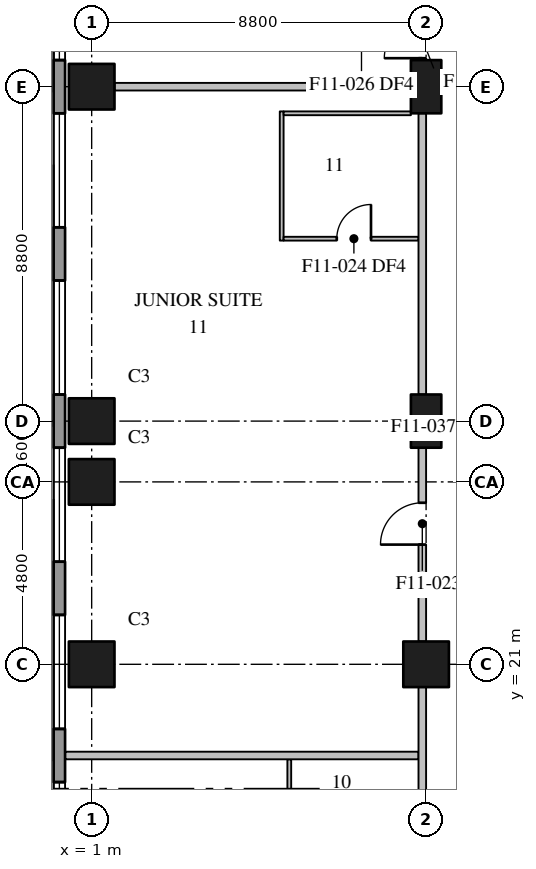
"""IFC4 building model, lengths in metres.
Left out: names, types, materials, properties, quantities, classifications, styles, units other than length and angle.
Written with IfcOpenShell. Run it as: python <this file> out.ifc"""

import sys

from ifc_helpers import new_model, si_unit, direction, frame, frame_2d, origin, origin_2d, place, context, subcontext, project, spatial, rectangle, extrude, element, fill, save


model = new_model("IFC4")
c1 = context("Model", 3, precision=1e-05, world=origin(), true_north=direction((0.0, 1.0)))
c2 = subcontext(c1, "Body", "Model", "MODEL_VIEW")
j1 = project(units=[si_unit("LENGTHUNIT", "METRE"), si_unit("PLANEANGLEUNIT", "RADIAN")], contexts=[c1])
p1 = place(None, origin())
s1 = spatial("IfcSite", under=j1, at=p1, CompositionType="ELEMENT")
p2 = place(p1, origin())
s2 = spatial("IfcBuilding", under=s1, at=p2, CompositionType="ELEMENT")
p3 = place(p2, frame((0.0, 0.0, 107.4)))
s3 = spatial("IfcBuildingStorey", under=s2, at=p3, CompositionType="ELEMENT", Elevation=107.4)
for number, where, z_axis, x_axis in (
    (1, (1.0, 21.0, 0.0), (0.0, 0.0, 1.0), (1.0, 0.0, 0.0)),
    (2, (1.0, 25.8, 0.0), (0.0, 0.0, 1.0), (1.0, 0.0, 0.0)),
    (3, (1.0, 27.4, 0.0), (0.0, 0.0, 1.0), (1.0, 0.0, 0.0)),
    (4, (1.0, 36.2, 0.0), (0.0, 0.0, 1.0), (1.0, 0.0, 0.0)),
    (5, (9.8, 21.0, 0.0), (0.0, 0.0, 1.0), (1.0, 0.0, 0.0)),
):
    element("IfcColumn", number, at=place(p3, frame(where, z_axis=z_axis, x_axis=x_axis)), inside=s3, PredefinedType="COLUMN", context=c2, shape_type="SweptSolid", body=[
        extrude(rectangle(XDim=1.2, YDim=1.2, at=origin_2d()), origin(), (0.0, 0.0, 1.0), 3.7),
    ])
for number, where, z_axis, x_axis in (
    (6, (9.8, 27.4, 0.0), (0.0, 0.0, 1.0), (0.0, 1.0, 0.0)),
    (7, (9.8, 36.2, 0.0), (0.0, 0.0, 1.0), (0.0, 1.0, 0.0)),
):
    element("IfcColumn", number, at=place(p3, frame(where, z_axis=z_axis, x_axis=x_axis)), inside=s3, PredefinedType="COLUMN", context=c2, shape_type="SweptSolid", body=[
        extrude(rectangle(XDim=1.4, YDim=0.8, at=origin_2d()), origin(), (0.0, 0.0, 1.0), 3.7),
    ])
p4 = place(p3, frame((0.15, 78.7, 0.0), z_axis=(0.0, 0.0, 1.0), x_axis=(0.0, -1.0, 0.0)))
e8 = element("IfcWall", 8, at=p4, inside=s3, PredefinedType="STANDARD", context=c2, shape_type="SweptSolid", body=[
    extrude(rectangle(XDim=76.5, YDim=0.3, at=frame_2d((38.25, 0.0))), origin(), (0.0, 0.0, 1.0), 3.4),
])
p5 = place(p4, frame((3.6, 0.0, 0.75)))
e9 = element("IfcOpeningElement", 9, at=p5, cuts=e8, PredefinedType="OPENING", context=c2, shape_type="SweptSolid", body=[
    extrude(rectangle(XDim=3.0, YDim=2.3, at=frame_2d((1.5, 1.15))), frame((0.0, 0.16, 0.0), z_axis=(0.0, -1.0, 0.0), x_axis=(1.0, 0.0, 0.0)), (0.0, 0.0, 1.0), 0.32),
])
p6 = place(p4, frame((8.0, 0.0, 0.75)))
e10 = element("IfcOpeningElement", 10, at=p6, cuts=e8, PredefinedType="OPENING", context=c2, shape_type="SweptSolid", body=[
    extrude(rectangle(XDim=3.0, YDim=2.3, at=frame_2d((1.5, 1.15))), frame((0.0, 0.16, 0.0), z_axis=(0.0, -1.0, 0.0), x_axis=(1.0, 0.0, 0.0)), (0.0, 0.0, 1.0), 0.32),
])
p7 = place(p4, frame((12.4, 0.0, 0.75)))
e11 = element("IfcOpeningElement", 11, at=p7, cuts=e8, PredefinedType="OPENING", context=c2, shape_type="SweptSolid", body=[
    extrude(rectangle(XDim=3.0, YDim=2.3, at=frame_2d((1.5, 1.15))), frame((0.0, 0.16, 0.0), z_axis=(0.0, -1.0, 0.0), x_axis=(1.0, 0.0, 0.0)), (0.0, 0.0, 1.0), 0.32),
])
p8 = place(p4, frame((16.8, 0.0, 0.75)))
e12 = element("IfcOpeningElement", 12, at=p8, cuts=e8, PredefinedType="OPENING", context=c2, shape_type="SweptSolid", body=[
    extrude(rectangle(XDim=3.0, YDim=2.3, at=frame_2d((1.5, 1.15))), frame((0.0, 0.16, 0.0), z_axis=(0.0, -1.0, 0.0), x_axis=(1.0, 0.0, 0.0)), (0.0, 0.0, 1.0), 0.32),
])
p9 = place(p4, frame((21.2, 0.0, 0.75)))
e13 = element("IfcOpeningElement", 13, at=p9, cuts=e8, PredefinedType="OPENING", context=c2, shape_type="SweptSolid", body=[
    extrude(rectangle(XDim=3.0, YDim=2.3, at=frame_2d((1.5, 1.15))), frame((0.0, 0.16, 0.0), z_axis=(0.0, -1.0, 0.0), x_axis=(1.0, 0.0, 0.0)), (0.0, 0.0, 1.0), 0.32),
])
p10 = place(p4, frame((25.6, 0.0, 0.75)))
e14 = element("IfcOpeningElement", 14, at=p10, cuts=e8, PredefinedType="OPENING", context=c2, shape_type="SweptSolid", body=[
    extrude(rectangle(XDim=3.0, YDim=2.3, at=frame_2d((1.5, 1.15))), frame((0.0, 0.16, 0.0), z_axis=(0.0, -1.0, 0.0), x_axis=(1.0, 0.0, 0.0)), (0.0, 0.0, 1.0), 0.32),
])
p11 = place(p4, frame((30.0, 0.0, 0.75)))
e15 = element("IfcOpeningElement", 15, at=p11, cuts=e8, PredefinedType="OPENING", context=c2, shape_type="SweptSolid", body=[
    extrude(rectangle(XDim=3.0, YDim=2.3, at=frame_2d((1.5, 1.15))), frame((0.0, 0.16, 0.0), z_axis=(0.0, -1.0, 0.0), x_axis=(1.0, 0.0, 0.0)), (0.0, 0.0, 1.0), 0.32),
])
p12 = place(p4, frame((34.4, 0.0, 0.75)))
e16 = element("IfcOpeningElement", 16, at=p12, cuts=e8, PredefinedType="OPENING", context=c2, shape_type="SweptSolid", body=[
    extrude(rectangle(XDim=3.0, YDim=2.3, at=frame_2d((1.5, 1.15))), frame((0.0, 0.16, 0.0), z_axis=(0.0, -1.0, 0.0), x_axis=(1.0, 0.0, 0.0)), (0.0, 0.0, 1.0), 0.32),
])
p13 = place(p4, frame((38.8, 0.0, 0.75)))
e17 = element("IfcOpeningElement", 17, at=p13, cuts=e8, PredefinedType="OPENING", context=c2, shape_type="SweptSolid", body=[
    extrude(rectangle(XDim=3.0, YDim=2.3, at=frame_2d((1.5, 1.15))), frame((0.0, 0.16, 0.0), z_axis=(0.0, -1.0, 0.0), x_axis=(1.0, 0.0, 0.0)), (0.0, 0.0, 1.0), 0.32),
])
p14 = place(p4, frame((43.2, 0.0, 0.75)))
e18 = element("IfcOpeningElement", 18, at=p14, cuts=e8, PredefinedType="OPENING", context=c2, shape_type="SweptSolid", body=[
    extrude(rectangle(XDim=3.0, YDim=2.3, at=frame_2d((1.5, 1.15))), frame((0.0, 0.16, 0.0), z_axis=(0.0, -1.0, 0.0), x_axis=(1.0, 0.0, 0.0)), (0.0, 0.0, 1.0), 0.32),
])
p15 = place(p4, frame((47.6, 0.0, 0.75)))
e19 = element("IfcOpeningElement", 19, at=p15, cuts=e8, PredefinedType="OPENING", context=c2, shape_type="SweptSolid", body=[
    extrude(rectangle(XDim=3.0, YDim=2.3, at=frame_2d((1.5, 1.15))), frame((0.0, 0.16, 0.0), z_axis=(0.0, -1.0, 0.0), x_axis=(1.0, 0.0, 0.0)), (0.0, 0.0, 1.0), 0.32),
])
p16 = place(p4, frame((52.0, 0.0, 0.75)))
e20 = element("IfcOpeningElement", 20, at=p16, cuts=e8, PredefinedType="OPENING", context=c2, shape_type="SweptSolid", body=[
    extrude(rectangle(XDim=3.0, YDim=2.3, at=frame_2d((1.5, 1.15))), frame((0.0, 0.16, 0.0), z_axis=(0.0, -1.0, 0.0), x_axis=(1.0, 0.0, 0.0)), (0.0, 0.0, 1.0), 0.32),
])
p17 = place(p4, frame((56.4, 0.0, 0.75)))
e21 = element("IfcOpeningElement", 21, at=p17, cuts=e8, PredefinedType="OPENING", context=c2, shape_type="SweptSolid", body=[
    extrude(rectangle(XDim=3.0, YDim=2.3, at=frame_2d((1.5, 1.15))), frame((0.0, 0.16, 0.0), z_axis=(0.0, -1.0, 0.0), x_axis=(1.0, 0.0, 0.0)), (0.0, 0.0, 1.0), 0.32),
])
p18 = place(p4, frame((60.8, 0.0, 0.75)))
e22 = element("IfcOpeningElement", 22, at=p18, cuts=e8, PredefinedType="OPENING", context=c2, shape_type="SweptSolid", body=[
    extrude(rectangle(XDim=3.0, YDim=2.3, at=frame_2d((1.5, 1.15))), frame((0.0, 0.16, 0.0), z_axis=(0.0, -1.0, 0.0), x_axis=(1.0, 0.0, 0.0)), (0.0, 0.0, 1.0), 0.32),
])
p19 = place(p4, frame((65.2, 0.0, 0.75)))
e23 = element("IfcOpeningElement", 23, at=p19, cuts=e8, PredefinedType="OPENING", context=c2, shape_type="SweptSolid", body=[
    extrude(rectangle(XDim=3.0, YDim=2.3, at=frame_2d((1.5, 1.15))), frame((0.0, 0.16, 0.0), z_axis=(0.0, -1.0, 0.0), x_axis=(1.0, 0.0, 0.0)), (0.0, 0.0, 1.0), 0.32),
])
p20 = place(p4, frame((69.6, 0.0, 0.75)))
e24 = element("IfcOpeningElement", 24, at=p20, cuts=e8, PredefinedType="OPENING", context=c2, shape_type="SweptSolid", body=[
    extrude(rectangle(XDim=3.0, YDim=2.3, at=frame_2d((1.5, 1.15))), frame((0.0, 0.16, 0.0), z_axis=(0.0, -1.0, 0.0), x_axis=(1.0, 0.0, 0.0)), (0.0, 0.0, 1.0), 0.32),
])
p21 = place(p3, frame((9.7, 12.9, 0.0), z_axis=(0.0, 0.0, 1.0), x_axis=(0.0, 1.0, 0.0)))
e25 = element("IfcWall", 25, at=p21, inside=s3, PredefinedType="PARTITIONING", context=c2, shape_type="SweptSolid", body=[
    extrude(rectangle(XDim=7.5, YDim=0.2, at=frame_2d((3.75, 0.0))), origin(), (0.0, 0.0, 1.0), 3.4),
])
p22 = place(p21, frame((1.7, 0.0, 0.0)))
e26 = element("IfcOpeningElement", 26, at=p22, cuts=e25, PredefinedType="OPENING", context=c2, shape_type="SweptSolid", body=[
    extrude(rectangle(XDim=1.0, YDim=2.1, at=frame_2d((0.5, 1.05))), frame((0.0, 0.11, 0.0), z_axis=(0.0, -1.0, 0.0), x_axis=(1.0, 0.0, 0.0)), (0.0, 0.0, 1.0), 0.22),
])
p23 = place(p3, frame((9.7, 21.6, 0.0), z_axis=(0.0, 0.0, 1.0), x_axis=(0.0, 1.0, 0.0)))
e27 = element("IfcWall", 27, at=p23, inside=s3, PredefinedType="PARTITIONING", context=c2, shape_type="SweptSolid", body=[
    extrude(rectangle(XDim=5.1, YDim=0.2, at=frame_2d((2.55, 0.0))), origin(), (0.0, 0.0, 1.0), 3.4),
])
p24 = place(p23, frame((2.55, 0.0, 0.0)))
e28 = element("IfcOpeningElement", 28, at=p24, cuts=e27, PredefinedType="OPENING", context=c2, shape_type="SweptSolid", body=[
    extrude(rectangle(XDim=1.1, YDim=2.1, at=frame_2d((0.55, 1.05))), frame((0.0, 0.11, 0.0), z_axis=(0.0, -1.0, 0.0), x_axis=(1.0, 0.0, 0.0)), (0.0, 0.0, 1.0), 0.22),
])
p25 = place(p3, frame((9.7, 28.1, 0.0), z_axis=(0.0, 0.0, 1.0), x_axis=(0.0, 1.0, 0.0)))
e29 = element("IfcWall", 29, at=p25, inside=s3, PredefinedType="PARTITIONING", context=c2, shape_type="SweptSolid", body=[
    extrude(rectangle(XDim=7.4, YDim=0.2, at=frame_2d((3.7, 0.0))), origin(), (0.0, 0.0, 1.0), 3.4),
])
p26 = place(p3, frame((9.7, 36.9, 0.0), z_axis=(0.0, 0.0, 1.0), x_axis=(0.0, 1.0, 0.0)))
e30 = element("IfcWall", 30, at=p26, inside=s3, PredefinedType="PARTITIONING", context=c2, shape_type="SweptSolid", body=[
    extrude(rectangle(XDim=7.4, YDim=0.2, at=frame_2d((3.7, 0.0))), origin(), (0.0, 0.0, 1.0), 3.4),
])
p27 = place(p26, frame((0.05, 0.0, 0.0)))
e31 = element("IfcOpeningElement", 31, at=p27, cuts=e30, PredefinedType="OPENING", context=c2, shape_type="SweptSolid", body=[
    extrude(rectangle(XDim=1.0, YDim=2.1, at=frame_2d((0.5, 1.05))), frame((0.0, 0.11, 0.0), z_axis=(0.0, -1.0, 0.0), x_axis=(1.0, 0.0, 0.0)), (0.0, 0.0, 1.0), 0.22),
])
p28 = place(p3, frame((0.31, 18.6, 0.0), z_axis=(0.0, 0.0, 1.0), x_axis=(1.0, 0.0, 0.0)))
e32 = element("IfcWall", 32, at=p28, inside=s3, PredefinedType="PARTITIONING", context=c2, shape_type="SweptSolid", body=[
    extrude(rectangle(XDim=9.29, YDim=0.2, at=frame_2d((4.645, 0.0))), origin(), (0.0, 0.0, 1.0), 3.4),
])
p29 = place(p3, frame((1.6, 36.2, 0.0), z_axis=(0.0, 0.0, 1.0), x_axis=(1.0, 0.0, 0.0)))
e33 = element("IfcWall", 33, at=p29, inside=s3, PredefinedType="PARTITIONING", context=c2, shape_type="SweptSolid", body=[
    extrude(rectangle(XDim=7.8, YDim=0.2, at=frame_2d((3.9, 0.0))), origin(), (0.0, 0.0, 1.0), 3.4),
])
p30 = place(p3, frame((6.2, 16.55, 0.0), z_axis=(0.0, 0.0, 1.0), x_axis=(0.0, 1.0, 0.0)))
e34 = element("IfcWall", 34, at=p30, inside=s3, PredefinedType="PARTITIONING", context=c2, shape_type="SweptSolid", body=[
    extrude(rectangle(XDim=1.95, YDim=0.1, at=frame_2d((0.975, 0.0))), origin(), (0.0, 0.0, 1.0), 3.4),
])
p31 = place(p3, frame((6.0, 32.15, 0.0), z_axis=(0.0, 0.0, 1.0), x_axis=(0.0, 1.0, 0.0)))
e35 = element("IfcWall", 35, at=p31, inside=s3, PredefinedType="PARTITIONING", context=c2, shape_type="SweptSolid", body=[
    extrude(rectangle(XDim=3.4, YDim=0.1, at=frame_2d((1.7, 0.0))), origin(), (0.0, 0.0, 1.0), 3.4),
])
p32 = place(p3, frame((6.05, 32.2, 0.0), z_axis=(0.0, 0.0, 1.0), x_axis=(1.0, 0.0, 0.0)))
e36 = element("IfcWall", 36, at=p32, inside=s3, PredefinedType="PARTITIONING", context=c2, shape_type="SweptSolid", body=[
    extrude(rectangle(XDim=3.55, YDim=0.1, at=frame_2d((1.775, 0.0))), origin(), (0.0, 0.0, 1.0), 3.4),
])
p33 = place(p32, frame((1.4, 0.0, 0.0)))
e37 = element("IfcOpeningElement", 37, at=p33, cuts=e36, PredefinedType="OPENING", context=c2, shape_type="SweptSolid", body=[
    extrude(rectangle(XDim=0.9, YDim=2.1, at=frame_2d((0.45, 1.05))), frame((0.0, 0.06, 0.0), z_axis=(0.0, -1.0, 0.0), x_axis=(1.0, 0.0, 0.0)), (0.0, 0.0, 1.0), 0.12),
])
p34 = place(p3, frame((6.05, 35.5, 0.0), z_axis=(0.0, 0.0, 1.0), x_axis=(1.0, 0.0, 0.0)))
e38 = element("IfcWall", 38, at=p34, inside=s3, PredefinedType="PARTITIONING", context=c2, shape_type="SweptSolid", body=[
    extrude(rectangle(XDim=3.35, YDim=0.1, at=frame_2d((1.675, 0.0))), origin(), (0.0, 0.0, 1.0), 3.4),
])
p35 = place(p13, origin())
e39 = element("IfcWindow", 39, at=p35, inside=s3, PartitioningType="SINGLE_PANEL", PredefinedType="WINDOW", context=c2, shape_type="SweptSolid", body=[
    extrude(rectangle(XDim=3.0, YDim=2.3, at=frame_2d((1.5, 1.15))), frame((0.0, 0.03, 0.0), z_axis=(0.0, -1.0, 0.0), x_axis=(1.0, 0.0, 0.0)), (0.0, 0.0, 1.0), 0.06),
])
fill(e17, e39)
p36 = place(p14, origin())
e40 = element("IfcWindow", 40, at=p36, inside=s3, PartitioningType="SINGLE_PANEL", PredefinedType="WINDOW", context=c2, shape_type="SweptSolid", body=[
    extrude(rectangle(XDim=3.0, YDim=2.3, at=frame_2d((1.5, 1.15))), frame((0.0, 0.03, 0.0), z_axis=(0.0, -1.0, 0.0), x_axis=(1.0, 0.0, 0.0)), (0.0, 0.0, 1.0), 0.06),
])
fill(e18, e40)
p37 = place(p15, origin())
e41 = element("IfcWindow", 41, at=p37, inside=s3, PartitioningType="SINGLE_PANEL", PredefinedType="WINDOW", context=c2, shape_type="SweptSolid", body=[
    extrude(rectangle(XDim=3.0, YDim=2.3, at=frame_2d((1.5, 1.15))), frame((0.0, 0.03, 0.0), z_axis=(0.0, -1.0, 0.0), x_axis=(1.0, 0.0, 0.0)), (0.0, 0.0, 1.0), 0.06),
])
fill(e19, e41)
p38 = place(p16, origin())
e42 = element("IfcWindow", 42, at=p38, inside=s3, PartitioningType="SINGLE_PANEL", PredefinedType="WINDOW", context=c2, shape_type="SweptSolid", body=[
    extrude(rectangle(XDim=3.0, YDim=2.3, at=frame_2d((1.5, 1.15))), frame((0.0, 0.03, 0.0), z_axis=(0.0, -1.0, 0.0), x_axis=(1.0, 0.0, 0.0)), (0.0, 0.0, 1.0), 0.06),
])
fill(e20, e42)
p39 = place(p17, origin())
e43 = element("IfcWindow", 43, at=p39, inside=s3, PartitioningType="SINGLE_PANEL", PredefinedType="WINDOW", context=c2, shape_type="SweptSolid", body=[
    extrude(rectangle(XDim=3.0, YDim=2.3, at=frame_2d((1.5, 1.15))), frame((0.0, 0.03, 0.0), z_axis=(0.0, -1.0, 0.0), x_axis=(1.0, 0.0, 0.0)), (0.0, 0.0, 1.0), 0.06),
])
fill(e21, e43)
p40 = place(p18, origin())
e44 = element("IfcWindow", 44, at=p40, inside=s3, PartitioningType="SINGLE_PANEL", PredefinedType="WINDOW", context=c2, shape_type="SweptSolid", body=[
    extrude(rectangle(XDim=3.0, YDim=2.3, at=frame_2d((1.5, 1.15))), frame((0.0, 0.03, 0.0), z_axis=(0.0, -1.0, 0.0), x_axis=(1.0, 0.0, 0.0)), (0.0, 0.0, 1.0), 0.06),
])
fill(e22, e44)
p41 = place(p24, origin())
e45 = element("IfcDoor", 45, at=p41, inside=s3, OperationType="SINGLE_SWING_LEFT", PredefinedType="DOOR", context=c2, shape_type="SweptSolid", body=[
    extrude(rectangle(XDim=1.1, YDim=2.1, at=frame_2d((0.55, 1.05))), frame((0.0, 0.025, 0.0), z_axis=(0.0, -1.0, 0.0), x_axis=(1.0, 0.0, 0.0)), (0.0, 0.0, 1.0), 0.05),
])
fill(e28, e45)
p42 = place(p33, origin())
e46 = element("IfcDoor", 46, at=p42, inside=s3, OperationType="SINGLE_SWING_RIGHT", PredefinedType="DOOR", context=c2, shape_type="SweptSolid", body=[
    extrude(rectangle(XDim=0.9, YDim=2.1, at=frame_2d((0.45, 1.05))), frame((0.0, 0.025, 0.0), z_axis=(0.0, -1.0, 0.0), x_axis=(1.0, 0.0, 0.0)), (0.0, 0.0, 1.0), 0.05),
])
fill(e37, e46)
p43 = place(p27, origin())
e47 = element("IfcDoor", 47, at=p43, inside=s3, OperationType="SINGLE_SWING_LEFT", PredefinedType="DOOR", context=c2, shape_type="SweptSolid", body=[
    extrude(rectangle(XDim=1.0, YDim=2.1, at=frame_2d((0.5, 1.05))), frame((0.0, 0.025, 0.0), z_axis=(0.0, -1.0, 0.0), x_axis=(1.0, 0.0, 0.0)), (0.0, 0.0, 1.0), 0.05),
])
fill(e31, e47)
save(model, sys.argv[1])
